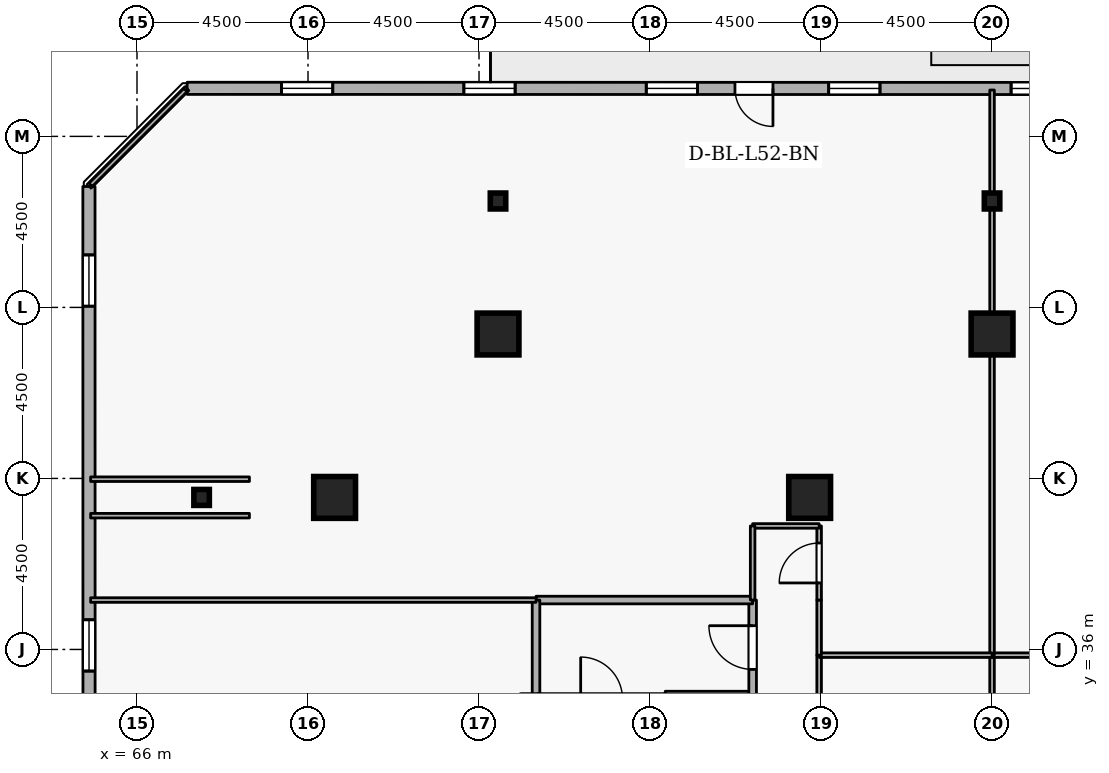
"""IFC4 building model, lengths in metres.
Left out: names, types, materials, properties, quantities, classifications, styles, units other than length and angle.
Written with IfcOpenShell. Run it as: python <this file> out.ifc"""

import sys

from ifc_helpers import new_model, si_unit, direction, frame, frame_2d, origin, origin_2d, place, context, subcontext, project, spatial, rectangle, i_section, extrude, element, fill, save


model = new_model("IFC4")
c1 = context("Model", 3, precision=1e-05, world=origin(), true_north=direction((0.0, 1.0)))
c2 = subcontext(c1, "Body", "Model", "MODEL_VIEW")
j1 = project(units=[si_unit("LENGTHUNIT", "METRE"), si_unit("PLANEANGLEUNIT", "RADIAN")], contexts=[c1])
p1 = place(None, origin())
s1 = spatial("IfcSite", under=j1, at=p1, CompositionType="ELEMENT")
p2 = place(p1, origin())
s2 = spatial("IfcBuilding", under=s1, at=p2, CompositionType="ELEMENT")
p3 = place(p2, frame((0.0, 0.0, 196.5)))
s3 = spatial("IfcBuildingStorey", under=s2, at=p3, CompositionType="ELEMENT", Elevation=196.5)
for number, where, z_axis, x_axis in (
    (1, (88.5, 44.3, 0.0), (0.0, 0.0, 1.0), (1.0, 0.0, 0.0)),
    (2, (75.5, 44.3, 0.0), (0.0, 0.0, 1.0), (1.0, 0.0, 0.0)),
    (3, (71.2, 40.0, 0.0), (0.0, 0.0, 1.0), (1.0, 0.0, 0.0)),
    (4, (83.7, 40.0, 0.0), (0.0, 0.0, 1.0), (1.0, 0.0, 0.0)),
):
    element("IfcColumn", number, at=place(p3, frame(where, z_axis=z_axis, x_axis=x_axis)), inside=s3, PredefinedType="COLUMN", context=c2, shape_type="SweptSolid", body=[
        extrude(rectangle(XDim=1.1, YDim=1.1, at=origin_2d()), origin(), (0.0, 0.0, 1.0), 3.6),
    ])
for number, where, z_axis, x_axis in (
    (5, (88.5, 47.8, 0.0), (0.0, 0.0, 1.0), (1.0, 0.0, 0.0)),
    (6, (75.5, 47.8, 0.0), (0.0, 0.0, 1.0), (1.0, 0.0, 0.0)),
    (7, (67.7, 40.0, 0.0), (0.0, 0.0, 1.0), (1.0, 0.0, 0.0)),
):
    element("IfcColumn", number, at=place(p3, frame(where, z_axis=z_axis, x_axis=x_axis)), inside=s3, PredefinedType="COLUMN", context=c2, shape_type="SweptSolid", body=[
        extrude(i_section(OverallWidth=0.407, OverallDepth=0.419, WebThickness=0.031, FlangeThickness=0.049, FilletRadius=0.015, at=origin_2d()), origin(), (0.0, 0.0, 1.0), 3.6),
    ])
p4 = place(p3, frame((101.751, 50.758, 0.0), z_axis=(0.0, 0.0, 1.0), x_axis=(-0.999999983007, 0.000184351399, 0.0)))
e8 = element("IfcWall", 8, at=p4, inside=s3, PredefinedType="STANDARD", context=c2, shape_type="SweptSolid", body=[
    extrude(rectangle(XDim=34.432, YDim=0.32, at=frame_2d((17.216, 0.0))), origin(), (0.0, 0.0, 1.0), 2.22),
])
p5 = place(p4, frame((19.016, 0.0, 0.0)))
e9 = element("IfcOpeningElement", 9, at=p5, cuts=e8, PredefinedType="OPENING", context=c2, shape_type="SweptSolid", body=[
    extrude(rectangle(XDim=1.0, YDim=2.08, at=frame_2d((0.5, 1.04))), frame((0.0, 0.17, 0.0), z_axis=(0.0, -1.0, 0.0), x_axis=(1.0, 0.0, 0.0)), (0.0, 0.0, 1.0), 0.34),
])
p6 = place(p4, frame((1.8, 0.0, 0.72)))
e10 = element("IfcOpeningElement", 10, at=p6, cuts=e8, PredefinedType="OPENING", context=c2, shape_type="SweptSolid", body=[
    extrude(rectangle(XDim=1.35, YDim=1.05, at=frame_2d((0.675, 0.525))), frame((0.0, 0.17, 0.0), z_axis=(0.0, -1.0, 0.0), x_axis=(1.0, 0.0, 0.0)), (0.0, 0.0, 1.0), 0.34),
])
p7 = place(p4, frame((6.6, 0.0, 0.72)))
e11 = element("IfcOpeningElement", 11, at=p7, cuts=e8, PredefinedType="OPENING", context=c2, shape_type="SweptSolid", body=[
    extrude(rectangle(XDim=1.35, YDim=1.05, at=frame_2d((0.675, 0.525))), frame((0.0, 0.17, 0.0), z_axis=(0.0, -1.0, 0.0), x_axis=(1.0, 0.0, 0.0)), (0.0, 0.0, 1.0), 0.34),
])
p8 = place(p4, frame((11.4, 0.0, 0.72)))
e12 = element("IfcOpeningElement", 12, at=p8, cuts=e8, PredefinedType="OPENING", context=c2, shape_type="SweptSolid", body=[
    extrude(rectangle(XDim=1.35, YDim=1.05, at=frame_2d((0.675, 0.525))), frame((0.0, 0.17, 0.0), z_axis=(0.0, -1.0, 0.0), x_axis=(1.0, 0.0, 0.0)), (0.0, 0.0, 1.0), 0.34),
])
p9 = place(p4, frame((16.2, 0.0, 0.72)))
e13 = element("IfcOpeningElement", 13, at=p9, cuts=e8, PredefinedType="OPENING", context=c2, shape_type="SweptSolid", body=[
    extrude(rectangle(XDim=1.35, YDim=1.05, at=frame_2d((0.675, 0.525))), frame((0.0, 0.17, 0.0), z_axis=(0.0, -1.0, 0.0), x_axis=(1.0, 0.0, 0.0)), (0.0, 0.0, 1.0), 0.34),
])
p10 = place(p4, frame((21.0, 0.0, 0.72)))
e14 = element("IfcOpeningElement", 14, at=p10, cuts=e8, PredefinedType="OPENING", context=c2, shape_type="SweptSolid", body=[
    extrude(rectangle(XDim=1.35, YDim=1.05, at=frame_2d((0.675, 0.525))), frame((0.0, 0.17, 0.0), z_axis=(0.0, -1.0, 0.0), x_axis=(1.0, 0.0, 0.0)), (0.0, 0.0, 1.0), 0.34),
])
p11 = place(p4, frame((25.8, 0.0, 0.72)))
e15 = element("IfcOpeningElement", 15, at=p11, cuts=e8, PredefinedType="OPENING", context=c2, shape_type="SweptSolid", body=[
    extrude(rectangle(XDim=1.35, YDim=1.05, at=frame_2d((0.675, 0.525))), frame((0.0, 0.17, 0.0), z_axis=(0.0, -1.0, 0.0), x_axis=(1.0, 0.0, 0.0)), (0.0, 0.0, 1.0), 0.34),
])
p12 = place(p4, frame((30.6, 0.0, 0.72)))
e16 = element("IfcOpeningElement", 16, at=p12, cuts=e8, PredefinedType="OPENING", context=c2, shape_type="SweptSolid", body=[
    extrude(rectangle(XDim=1.35, YDim=1.05, at=frame_2d((0.675, 0.525))), frame((0.0, 0.17, 0.0), z_axis=(0.0, -1.0, 0.0), x_axis=(1.0, 0.0, 0.0)), (0.0, 0.0, 1.0), 0.34),
])
p13 = place(p3, frame((64.735, 48.181, 0.0), z_axis=(0.0, 0.0, 1.0), x_axis=(0.000184351399, -0.999999983007, 0.0)))
e17 = element("IfcWall", 17, at=p13, inside=s3, PredefinedType="STANDARD", context=c2, shape_type="SweptSolid", body=[
    extrude(rectangle(XDim=34.432, YDim=0.32, at=frame_2d((17.216, 0.0))), origin(), (0.0, 0.0, 1.0), 2.22),
])
p14 = place(p13, frame((1.8, 0.0, 0.72)))
e18 = element("IfcOpeningElement", 18, at=p14, cuts=e17, PredefinedType="OPENING", context=c2, shape_type="SweptSolid", body=[
    extrude(rectangle(XDim=1.35, YDim=1.05, at=frame_2d((0.675, 0.525))), frame((0.0, 0.17, 0.0), z_axis=(0.0, -1.0, 0.0), x_axis=(1.0, 0.0, 0.0)), (0.0, 0.0, 1.0), 0.34),
])
p15 = place(p13, frame((11.4, 0.0, 0.72)))
e19 = element("IfcOpeningElement", 19, at=p15, cuts=e17, PredefinedType="OPENING", context=c2, shape_type="SweptSolid", body=[
    extrude(rectangle(XDim=1.35, YDim=1.05, at=frame_2d((0.675, 0.525))), frame((0.0, 0.17, 0.0), z_axis=(0.0, -1.0, 0.0), x_axis=(1.0, 0.0, 0.0)), (0.0, 0.0, 1.0), 0.34),
])
p16 = place(p13, frame((16.2, 0.0, 0.72)))
e20 = element("IfcOpeningElement", 20, at=p16, cuts=e17, PredefinedType="OPENING", context=c2, shape_type="SweptSolid", body=[
    extrude(rectangle(XDim=1.35, YDim=1.05, at=frame_2d((0.675, 0.525))), frame((0.0, 0.17, 0.0), z_axis=(0.0, -1.0, 0.0), x_axis=(1.0, 0.0, 0.0)), (0.0, 0.0, 1.0), 0.34),
])
p17 = place(p13, frame((21.0, 0.0, 0.72)))
e21 = element("IfcOpeningElement", 21, at=p17, cuts=e17, PredefinedType="OPENING", context=c2, shape_type="SweptSolid", body=[
    extrude(rectangle(XDim=1.35, YDim=1.05, at=frame_2d((0.675, 0.525))), frame((0.0, 0.17, 0.0), z_axis=(0.0, -1.0, 0.0), x_axis=(1.0, 0.0, 0.0)), (0.0, 0.0, 1.0), 0.34),
])
p18 = place(p13, frame((25.8, 0.0, 0.72)))
e22 = element("IfcOpeningElement", 22, at=p18, cuts=e17, PredefinedType="OPENING", context=c2, shape_type="SweptSolid", body=[
    extrude(rectangle(XDim=1.35, YDim=1.05, at=frame_2d((0.675, 0.525))), frame((0.0, 0.17, 0.0), z_axis=(0.0, -1.0, 0.0), x_axis=(1.0, 0.0, 0.0)), (0.0, 0.0, 1.0), 0.34),
])
p19 = place(p13, frame((30.6, 0.0, 0.72)))
e23 = element("IfcOpeningElement", 23, at=p19, cuts=e17, PredefinedType="OPENING", context=c2, shape_type="SweptSolid", body=[
    extrude(rectangle(XDim=1.35, YDim=1.05, at=frame_2d((0.675, 0.525))), frame((0.0, 0.17, 0.0), z_axis=(0.0, -1.0, 0.0), x_axis=(1.0, 0.0, 0.0)), (0.0, 0.0, 1.0), 0.34),
])
p20 = place(p3, frame((79.9, 34.8, 0.0), z_axis=(0.0, 0.0, 1.0), x_axis=(1.0, 0.0, 0.0)))
e24 = element("IfcWall", 24, at=p20, inside=s3, PredefinedType="STANDARD", context=c2, shape_type="SweptSolid", body=[
    extrude(rectangle(XDim=2.3, YDim=0.2, at=frame_2d((1.15, 0.0))), origin(), (0.0, 0.0, 1.0), 2.525),
])
p21 = place(p3, frame((82.2, 34.8, 0.0), z_axis=(0.0, 0.0, 1.0), x_axis=(0.0, 1.0, 0.0)))
e25 = element("IfcWall", 25, at=p21, inside=s3, PredefinedType="STANDARD", context=c2, shape_type="SweptSolid", body=[
    extrude(rectangle(XDim=2.5, YDim=0.2, at=frame_2d((1.25, 0.0))), origin(), (0.0, 0.0, 1.0), 3.32),
])
p22 = place(p21, frame((0.675, 0.0, 0.0)))
e26 = element("IfcOpeningElement", 26, at=p22, cuts=e25, PredefinedType="OPENING", context=c2, shape_type="SweptSolid", body=[
    extrude(rectangle(XDim=1.15, YDim=2.1, at=frame_2d((0.575, 1.05))), frame((0.0, 0.11, 0.0), z_axis=(0.0, -1.0, 0.0), x_axis=(1.0, 0.0, 0.0)), (0.0, 0.0, 1.0), 0.22),
])
p23 = place(p3, frame((82.2, 37.3, 0.0), z_axis=(0.0, 0.0, 1.0), x_axis=(-1.0, 0.0, 0.0)))
e27 = element("IfcWall", 27, at=p23, inside=s3, PredefinedType="STANDARD", context=c2, shape_type="SweptSolid", body=[
    extrude(rectangle(XDim=5.7, YDim=0.2, at=frame_2d((2.85, 0.0))), origin(), (0.0, 0.0, 1.0), 3.32),
])
p24 = place(p3, frame((76.5, 37.3, 0.0), z_axis=(0.0, 0.0, 1.0), x_axis=(0.0, -1.0, 0.0)))
e28 = element("IfcWall", 28, at=p24, inside=s3, PredefinedType="STANDARD", context=c2, shape_type="SweptSolid", body=[
    extrude(rectangle(XDim=2.5, YDim=0.2, at=frame_2d((1.25, 0.0))), origin(), (0.0, 0.0, 1.0), 3.32),
])
p25 = place(p3, frame((88.5, 33.95, 0.0), z_axis=(0.0, 0.0, 1.0), x_axis=(0.0, 1.0, 0.0)))
e29 = element("IfcWall", 29, at=p25, inside=s3, PredefinedType="PARTITIONING", context=c2, shape_type="SweptSolid", body=[
    extrude(rectangle(XDim=1.9, YDim=0.12, at=frame_2d((0.95, 0.0))), origin(), (0.0, 0.0, 1.0), 3.32),
])
p26 = place(p3, frame((88.5, 35.85, 0.0), z_axis=(0.0, 0.0, 1.0), x_axis=(1.0, 0.0, 0.0)))
e30 = element("IfcWall", 30, at=p26, inside=s3, PredefinedType="PARTITIONING", context=c2, shape_type="SweptSolid", body=[
    extrude(rectangle(XDim=4.55, YDim=0.12, at=frame_2d((2.275, 0.0))), origin(), (0.0, 0.0, 1.0), 3.32),
])
p27 = place(p3, frame((88.5, 35.85, 0.0), z_axis=(0.0, 0.0, 1.0), x_axis=(0.0, 1.0, 0.0)))
e31 = element("IfcWall", 31, at=p27, inside=s3, PredefinedType="PARTITIONING", context=c2, shape_type="SweptSolid", body=[
    extrude(rectangle(XDim=14.87, YDim=0.12, at=frame_2d((7.435, 0.0))), origin(), (0.0, 0.0, 1.0), 2.862),
])
p28 = place(p3, frame((83.95, 33.95, 0.0), z_axis=(0.0, 0.0, 1.0), x_axis=(0.0, 1.0, 0.0)))
e32 = element("IfcWall", 32, at=p28, inside=s3, PredefinedType="PARTITIONING", context=c2, shape_type="SweptSolid", body=[
    extrude(rectangle(XDim=1.9, YDim=0.12, at=frame_2d((0.95, 0.0))), origin(), (0.0, 0.0, 1.0), 3.32),
])
p29 = place(p3, frame((83.95, 35.85, 0.0), z_axis=(0.0, 0.0, 1.0), x_axis=(1.0, 0.0, 0.0)))
e33 = element("IfcWall", 33, at=p29, inside=s3, PredefinedType="PARTITIONING", context=c2, shape_type="SweptSolid", body=[
    extrude(rectangle(XDim=4.55, YDim=0.12, at=frame_2d((2.275, 0.0))), origin(), (0.0, 0.0, 1.0), 3.32),
])
p30 = place(p3, frame((83.95, 35.85, 0.0), z_axis=(0.0, 0.0, 1.0), x_axis=(0.0, 1.0, 0.0)))
e34 = element("IfcWall", 34, at=p30, inside=s3, PredefinedType="PARTITIONING", context=c2, shape_type="SweptSolid", body=[
    extrude(rectangle(XDim=1.45, YDim=0.12, at=frame_2d((0.725, 0.0))), origin(), (0.0, 0.0, 1.0), 3.32),
])
p31 = place(p3, frame((83.95, 37.3, 0.0), z_axis=(0.0, 0.0, 1.0), x_axis=(0.0, 1.0, 0.0)))
e35 = element("IfcWall", 35, at=p31, inside=s3, PredefinedType="PARTITIONING", context=c2, shape_type="SweptSolid", body=[
    extrude(rectangle(XDim=1.95, YDim=0.12, at=frame_2d((0.975, 0.0))), origin(), (0.0, 0.0, 1.0), 3.32),
])
p32 = place(p31, frame((0.45, 0.0, 0.0)))
e36 = element("IfcOpeningElement", 36, at=p32, cuts=e35, PredefinedType="OPENING", context=c2, shape_type="SweptSolid", body=[
    extrude(rectangle(XDim=1.05, YDim=2.1, at=frame_2d((0.525, 1.05))), frame((0.0, 0.07, 0.0), z_axis=(0.0, -1.0, 0.0), x_axis=(1.0, 0.0, 0.0)), (0.0, 0.0, 1.0), 0.14),
])
p33 = place(p3, frame((83.95, 39.25, 0.0), z_axis=(0.0, 0.0, 1.0), x_axis=(-1.0, 0.0, 0.0)))
e37 = element("IfcWall", 37, at=p33, inside=s3, PredefinedType="PARTITIONING", context=c2, shape_type="SweptSolid", body=[
    extrude(rectangle(XDim=1.75, YDim=0.12, at=frame_2d((0.875, 0.0))), origin(), (0.0, 0.0, 1.0), 3.32),
])
p34 = place(p3, frame((82.2, 39.25, 0.0), z_axis=(0.0, 0.0, 1.0), x_axis=(0.0, -1.0, 0.0)))
e38 = element("IfcWall", 38, at=p34, inside=s3, PredefinedType="PARTITIONING", context=c2, shape_type="SweptSolid", body=[
    extrude(rectangle(XDim=1.95, YDim=0.12, at=frame_2d((0.975, 0.0))), origin(), (0.0, 0.0, 1.0), 3.32),
])
p35 = place(p3, frame((76.5, 37.3, 0.0), z_axis=(0.0, 0.0, 1.0), x_axis=(-1.0, 0.0, 0.0)))
e39 = element("IfcWall", 39, at=p35, inside=s3, PredefinedType="PARTITIONING", context=c2, shape_type="SweptSolid", body=[
    extrude(rectangle(XDim=11.72, YDim=0.12, at=frame_2d((5.86, 0.0))), origin(), (0.0, 0.0, 1.0), 3.32),
])
for number, where, z_axis, x_axis in (
    (40, (64.78, 39.52, 0.0), (0.0, 0.0, 1.0), (1.0, 0.0, 0.0)),
    (41, (68.958, 40.48, 0.0), (0.0, 0.0, 1.0), (-1.0, 0.0, 0.0)),
):
    element("IfcWall", number, at=place(p3, frame(where, z_axis=z_axis, x_axis=x_axis)), inside=s3, PredefinedType="PARTITIONING", context=c2, shape_type="SweptSolid", body=[
        extrude(rectangle(XDim=4.178, YDim=0.12, at=frame_2d((2.089, 0.0))), origin(), (0.0, 0.0, 1.0), 1.785),
    ])
p36 = place(p3, frame((64.78, 48.225, 0.0), z_axis=(0.0, 0.0, 1.0), x_axis=(0.707106781187, 0.707106781187, 0.0)))
e42 = element("IfcWall", 42, at=p36, inside=s3, PredefinedType="PARTITIONING", context=c2, shape_type="SweptSolid", body=[
    extrude(rectangle(XDim=3.528, YDim=0.12, at=frame_2d((1.764, 0.0))), origin(), (0.0, 0.0, 1.0), 3.32),
])
p37 = place(p5, origin())
e43 = element("IfcDoor", 43, at=p37, inside=s3, OperationType="SINGLE_SWING_LEFT", PredefinedType="DOOR", context=c2, shape_type="SweptSolid", body=[
    extrude(rectangle(XDim=1.0, YDim=2.08, at=frame_2d((0.5, 1.04))), frame((0.0, 0.025, 0.0), z_axis=(0.0, -1.0, 0.0), x_axis=(1.0, 0.0, 0.0)), (0.0, 0.0, 1.0), 0.05),
])
fill(e9, e43)
p38 = place(p8, origin())
e44 = element("IfcWindow", 44, at=p38, inside=s3, PartitioningType="SINGLE_PANEL", PredefinedType="WINDOW", context=c2, shape_type="SweptSolid", body=[
    extrude(rectangle(XDim=1.35, YDim=1.05, at=frame_2d((0.675, 0.525))), frame((0.0, 0.03, 0.0), z_axis=(0.0, -1.0, 0.0), x_axis=(1.0, 0.0, 0.0)), (0.0, 0.0, 1.0), 0.06),
])
fill(e12, e44)
p39 = place(p9, origin())
e45 = element("IfcWindow", 45, at=p39, inside=s3, PartitioningType="SINGLE_PANEL", PredefinedType="WINDOW", context=c2, shape_type="SweptSolid", body=[
    extrude(rectangle(XDim=1.35, YDim=1.05, at=frame_2d((0.675, 0.525))), frame((0.0, 0.03, 0.0), z_axis=(0.0, -1.0, 0.0), x_axis=(1.0, 0.0, 0.0)), (0.0, 0.0, 1.0), 0.06),
])
fill(e13, e45)
p40 = place(p10, origin())
e46 = element("IfcWindow", 46, at=p40, inside=s3, PartitioningType="SINGLE_PANEL", PredefinedType="WINDOW", context=c2, shape_type="SweptSolid", body=[
    extrude(rectangle(XDim=1.35, YDim=1.05, at=frame_2d((0.675, 0.525))), frame((0.0, 0.03, 0.0), z_axis=(0.0, -1.0, 0.0), x_axis=(1.0, 0.0, 0.0)), (0.0, 0.0, 1.0), 0.06),
])
fill(e14, e46)
p41 = place(p11, origin())
e47 = element("IfcWindow", 47, at=p41, inside=s3, PartitioningType="SINGLE_PANEL", PredefinedType="WINDOW", context=c2, shape_type="SweptSolid", body=[
    extrude(rectangle(XDim=1.35, YDim=1.05, at=frame_2d((0.675, 0.525))), frame((0.0, 0.03, 0.0), z_axis=(0.0, -1.0, 0.0), x_axis=(1.0, 0.0, 0.0)), (0.0, 0.0, 1.0), 0.06),
])
fill(e15, e47)
p42 = place(p12, origin())
e48 = element("IfcWindow", 48, at=p42, inside=s3, PartitioningType="SINGLE_PANEL", PredefinedType="WINDOW", context=c2, shape_type="SweptSolid", body=[
    extrude(rectangle(XDim=1.35, YDim=1.05, at=frame_2d((0.675, 0.525))), frame((0.0, 0.03, 0.0), z_axis=(0.0, -1.0, 0.0), x_axis=(1.0, 0.0, 0.0)), (0.0, 0.0, 1.0), 0.06),
])
fill(e16, e48)
p43 = place(p14, origin())
e49 = element("IfcWindow", 49, at=p43, inside=s3, PartitioningType="SINGLE_PANEL", PredefinedType="WINDOW", context=c2, shape_type="SweptSolid", body=[
    extrude(rectangle(XDim=1.35, YDim=1.05, at=frame_2d((0.675, 0.525))), frame((0.0, 0.03, 0.0), z_axis=(0.0, -1.0, 0.0), x_axis=(1.0, 0.0, 0.0)), (0.0, 0.0, 1.0), 0.06),
])
fill(e18, e49)
p44 = place(p15, origin())
e50 = element("IfcWindow", 50, at=p44, inside=s3, PartitioningType="SINGLE_PANEL", PredefinedType="WINDOW", context=c2, shape_type="SweptSolid", body=[
    extrude(rectangle(XDim=1.35, YDim=1.05, at=frame_2d((0.675, 0.525))), frame((0.0, 0.03, 0.0), z_axis=(0.0, -1.0, 0.0), x_axis=(1.0, 0.0, 0.0)), (0.0, 0.0, 1.0), 0.06),
])
fill(e19, e50)
p45 = place(p22, origin())
e51 = element("IfcDoor", 51, at=p45, inside=s3, OperationType="SINGLE_SWING_RIGHT", PredefinedType="DOOR", context=c2, shape_type="SweptSolid", body=[
    extrude(rectangle(XDim=1.15, YDim=2.1, at=frame_2d((0.575, 1.05))), frame((0.0, 0.025, 0.0), z_axis=(0.0, -1.0, 0.0), x_axis=(1.0, 0.0, 0.0)), (0.0, 0.0, 1.0), 0.05),
])
fill(e26, e51)
p46 = place(p32, origin())
e52 = element("IfcDoor", 52, at=p46, inside=s3, OperationType="SINGLE_SWING_LEFT", PredefinedType="DOOR", context=c2, shape_type="SweptSolid", body=[
    extrude(rectangle(XDim=1.05, YDim=2.1, at=frame_2d((0.525, 1.05))), frame((0.0, 0.025, 0.0), z_axis=(0.0, -1.0, 0.0), x_axis=(1.0, 0.0, 0.0)), (0.0, 0.0, 1.0), 0.05),
])
fill(e36, e52)
save(model, sys.argv[1])
